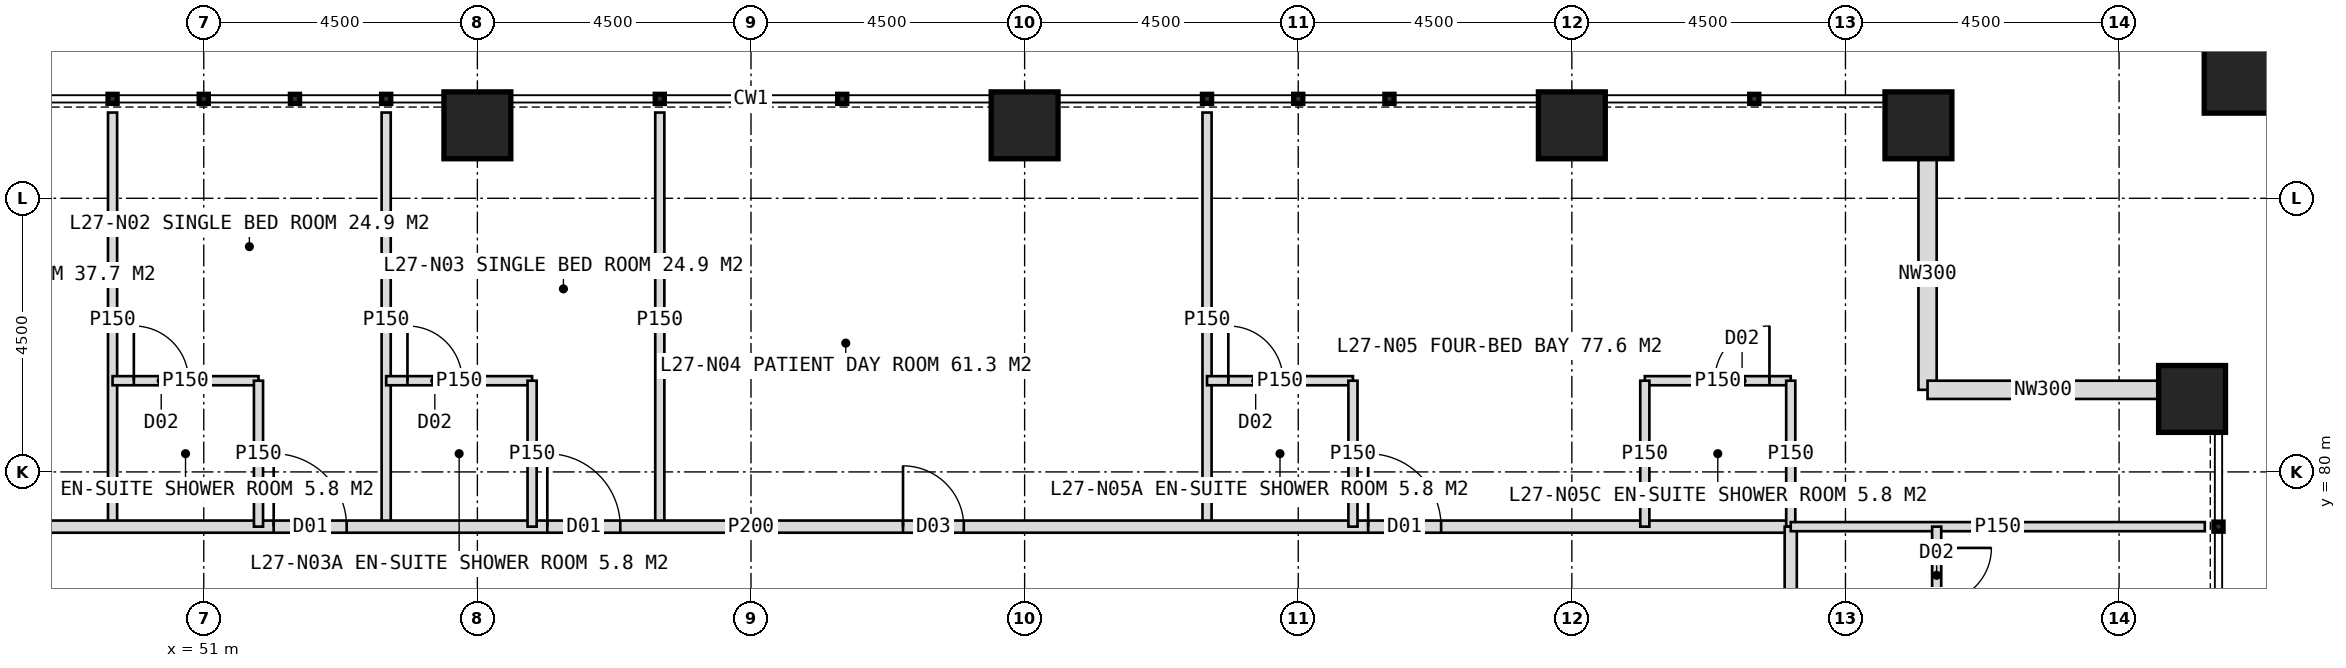
"""IFC4 building model, lengths in metres.
Left out: names, types, materials, properties, quantities, classifications, styles, units other than length and angle.
Written with IfcOpenShell. Run it as: python <this file> out.ifc"""

import sys

from ifc_helpers import new_model, si_unit, direction, frame, frame_2d, origin, origin_2d, place, context, subcontext, project, spatial, rectangle, hollow_rectangle, extrude, element, fill, save


model = new_model("IFC4")
c1 = context("Model", 3, precision=1e-05, world=origin(), true_north=direction((0.0, 1.0)))
c2 = subcontext(c1, "Body", "Model", "MODEL_VIEW")
j1 = project(units=[si_unit("LENGTHUNIT", "METRE"), si_unit("PLANEANGLEUNIT", "RADIAN")], contexts=[c1])
p1 = place(None, origin())
s1 = spatial("IfcSite", under=j1, at=p1, CompositionType="ELEMENT")
p2 = place(p1, origin())
s2 = spatial("IfcBuilding", under=s1, at=p2, CompositionType="ELEMENT")
p3 = place(p2, frame((0.0, 0.0, 116.0)))
s3 = spatial("IfcBuildingStorey", under=s2, at=p3, CompositionType="ELEMENT", Elevation=116.0)
for number, where, z_axis, x_axis in (
    (1, (55.5, 85.7, 0.0), (0.0, 0.0, 1.0), (1.0, 0.0, 0.0)),
    (2, (64.5, 85.7, 0.0), (0.0, 0.0, 1.0), (1.0, 0.0, 0.0)),
    (3, (73.5, 85.7, 0.0), (0.0, 0.0, 1.0), (1.0, 0.0, 0.0)),
    (4, (79.2, 85.7, 0.0), (0.0, 0.0, 1.0), (1.0, 0.0, 0.0)),
    (5, (83.7, 81.2, 0.0), (0.0, 0.0, 1.0), (1.0, 0.0, 0.0)),
):
    element("IfcColumn", number, at=place(p3, frame(where, z_axis=z_axis, x_axis=x_axis)), inside=s3, PredefinedType="COLUMN", context=c2, shape_type="SweptSolid", body=[
        extrude(hollow_rectangle(XDim=1.1, YDim=1.1, WallThickness=0.1, at=origin_2d()), origin(), (0.0, 0.0, 1.0), 4.0),
    ])
p4 = place(p3, frame((84.6, 86.6, 0.0), z_axis=(0.0, 0.0, 1.0), x_axis=(1.0, 0.0, 0.0)))
e6 = element("IfcColumn", 6, at=p4, inside=s3, PredefinedType="COLUMN", context=c2, shape_type="SweptSolid", body=[
    extrude(hollow_rectangle(XDim=1.4, YDim=1.4, WallThickness=0.08, at=origin_2d()), origin(), (0.0, 0.0, 1.0), 4.0),
])
for number, where, z_axis, x_axis in (
    (7, (79.35, 85.15, 0.0), (0.0, 0.0, 1.0), (0.0, -1.0, 0.0)),
    (8, (79.35, 81.35, 0.0), (0.0, 0.0, 1.0), (1.0, 0.0, 0.0)),
):
    element("IfcWall", number, at=place(p3, frame(where, z_axis=z_axis, x_axis=x_axis)), inside=s3, PredefinedType="ELEMENTEDWALL", context=c2, shape_type="SweptSolid", body=[
        extrude(rectangle(XDim=3.8, YDim=0.3, at=frame_2d((1.9, 0.0))), origin(), (0.0, 0.0, 1.0), 4.0),
    ])
for number, where, z_axis, x_axis in (
    (9, (49.5, 79.1, 0.0), (0.0, 0.0, 1.0), (0.0, 1.0, 0.0)),
    (10, (54.0, 79.1, 0.0), (0.0, 0.0, 1.0), (0.0, 1.0, 0.0)),
    (11, (58.5, 79.1, 0.0), (0.0, 0.0, 1.0), (0.0, 1.0, 0.0)),
    (12, (67.5, 79.1, 0.0), (0.0, 0.0, 1.0), (0.0, 1.0, 0.0)),
):
    element("IfcWall", number, at=place(p3, frame(where, z_axis=z_axis, x_axis=x_axis)), inside=s3, PredefinedType="PARTITIONING", context=c2, shape_type="SweptSolid", body=[
        extrude(rectangle(XDim=6.81, YDim=0.15, at=frame_2d((3.405, 0.0))), origin(), (0.0, 0.0, 1.0), 3.75),
    ])
p5 = place(p3, frame((42.9, 79.1, 0.0), z_axis=(0.0, 0.0, 1.0), x_axis=(1.0, 0.0, 0.0)))
e13 = element("IfcWall", 13, at=p5, inside=s3, PredefinedType="PARTITIONING", context=c2, shape_type="SweptSolid", body=[
    extrude(rectangle(XDim=34.2, YDim=0.2, at=frame_2d((17.1, 0.0))), origin(), (0.0, 0.0, 1.0), 3.75),
])
p6 = place(p5, frame((3.25, 0.0, 0.0)))
e14 = element("IfcOpeningElement", 14, at=p6, cuts=e13, PredefinedType="OPENING", context=c2, shape_type="SweptSolid", body=[
    extrude(rectangle(XDim=1.2, YDim=2.2, at=frame_2d((0.6, 1.1))), frame((0.0, 0.11, 0.0), z_axis=(0.0, -1.0, 0.0), x_axis=(1.0, 0.0, 0.0)), (0.0, 0.0, 1.0), 0.22),
])
p7 = place(p5, frame((9.25, 0.0, 0.0)))
e15 = element("IfcOpeningElement", 15, at=p7, cuts=e13, PredefinedType="OPENING", context=c2, shape_type="SweptSolid", body=[
    extrude(rectangle(XDim=1.2, YDim=2.2, at=frame_2d((0.6, 1.1))), frame((0.0, 0.11, 0.0), z_axis=(0.0, -1.0, 0.0), x_axis=(1.0, 0.0, 0.0)), (0.0, 0.0, 1.0), 0.22),
])
p8 = place(p5, frame((13.75, 0.0, 0.0)))
e16 = element("IfcOpeningElement", 16, at=p8, cuts=e13, PredefinedType="OPENING", context=c2, shape_type="SweptSolid", body=[
    extrude(rectangle(XDim=1.2, YDim=2.2, at=frame_2d((0.6, 1.1))), frame((0.0, 0.11, 0.0), z_axis=(0.0, -1.0, 0.0), x_axis=(1.0, 0.0, 0.0)), (0.0, 0.0, 1.0), 0.22),
])
p9 = place(p5, frame((19.6, 0.0, 0.0)))
e17 = element("IfcOpeningElement", 17, at=p9, cuts=e13, PredefinedType="OPENING", context=c2, shape_type="SweptSolid", body=[
    extrude(rectangle(XDim=1.0, YDim=2.1, at=frame_2d((0.5, 1.05))), frame((0.0, 0.11, 0.0), z_axis=(0.0, -1.0, 0.0), x_axis=(1.0, 0.0, 0.0)), (0.0, 0.0, 1.0), 0.22),
])
p10 = place(p5, frame((27.25, 0.0, 0.0)))
e18 = element("IfcOpeningElement", 18, at=p10, cuts=e13, PredefinedType="OPENING", context=c2, shape_type="SweptSolid", body=[
    extrude(rectangle(XDim=1.2, YDim=2.2, at=frame_2d((0.6, 1.1))), frame((0.0, 0.11, 0.0), z_axis=(0.0, -1.0, 0.0), x_axis=(1.0, 0.0, 0.0)), (0.0, 0.0, 1.0), 0.22),
])
p11 = place(p3, frame((49.5, 81.5, 0.0), z_axis=(0.0, 0.0, 1.0), x_axis=(1.0, 0.0, 0.0)))
e19 = element("IfcWall", 19, at=p11, inside=s3, PredefinedType="PARTITIONING", context=c2, shape_type="SweptSolid", body=[
    extrude(rectangle(XDim=2.4, YDim=0.15, at=frame_2d((1.2, 0.0))), origin(), (0.0, 0.0, 1.0), 3.75),
])
p12 = place(p11, frame((0.35, 0.0, 0.0)))
e20 = element("IfcOpeningElement", 20, at=p12, cuts=e19, PredefinedType="OPENING", context=c2, shape_type="SweptSolid", body=[
    extrude(rectangle(XDim=0.9, YDim=2.1, at=frame_2d((0.45, 1.05))), frame((0.0, 0.085, 0.0), z_axis=(0.0, -1.0, 0.0), x_axis=(1.0, 0.0, 0.0)), (0.0, 0.0, 1.0), 0.17),
])
p13 = place(p3, frame((51.9, 79.1, 0.0), z_axis=(0.0, 0.0, 1.0), x_axis=(0.0, 1.0, 0.0)))
e21 = element("IfcWall", 21, at=p13, inside=s3, PredefinedType="PARTITIONING", context=c2, shape_type="SweptSolid", body=[
    extrude(rectangle(XDim=2.4, YDim=0.15, at=frame_2d((1.2, 0.0))), origin(), (0.0, 0.0, 1.0), 3.75),
])
p14 = place(p3, frame((54.0, 81.5, 0.0), z_axis=(0.0, 0.0, 1.0), x_axis=(1.0, 0.0, 0.0)))
e22 = element("IfcWall", 22, at=p14, inside=s3, PredefinedType="PARTITIONING", context=c2, shape_type="SweptSolid", body=[
    extrude(rectangle(XDim=2.4, YDim=0.15, at=frame_2d((1.2, 0.0))), origin(), (0.0, 0.0, 1.0), 3.75),
])
p15 = place(p14, frame((0.35, 0.0, 0.0)))
e23 = element("IfcOpeningElement", 23, at=p15, cuts=e22, PredefinedType="OPENING", context=c2, shape_type="SweptSolid", body=[
    extrude(rectangle(XDim=0.9, YDim=2.1, at=frame_2d((0.45, 1.05))), frame((0.0, 0.085, 0.0), z_axis=(0.0, -1.0, 0.0), x_axis=(1.0, 0.0, 0.0)), (0.0, 0.0, 1.0), 0.17),
])
p16 = place(p3, frame((56.4, 79.1, 0.0), z_axis=(0.0, 0.0, 1.0), x_axis=(0.0, 1.0, 0.0)))
e24 = element("IfcWall", 24, at=p16, inside=s3, PredefinedType="PARTITIONING", context=c2, shape_type="SweptSolid", body=[
    extrude(rectangle(XDim=2.4, YDim=0.15, at=frame_2d((1.2, 0.0))), origin(), (0.0, 0.0, 1.0), 3.75),
])
p17 = place(p3, frame((67.5, 81.5, 0.0), z_axis=(0.0, 0.0, 1.0), x_axis=(1.0, 0.0, 0.0)))
e25 = element("IfcWall", 25, at=p17, inside=s3, PredefinedType="PARTITIONING", context=c2, shape_type="SweptSolid", body=[
    extrude(rectangle(XDim=2.4, YDim=0.15, at=frame_2d((1.2, 0.0))), origin(), (0.0, 0.0, 1.0), 3.75),
])
p18 = place(p17, frame((0.35, 0.0, 0.0)))
e26 = element("IfcOpeningElement", 26, at=p18, cuts=e25, PredefinedType="OPENING", context=c2, shape_type="SweptSolid", body=[
    extrude(rectangle(XDim=0.9, YDim=2.1, at=frame_2d((0.45, 1.05))), frame((0.0, 0.085, 0.0), z_axis=(0.0, -1.0, 0.0), x_axis=(1.0, 0.0, 0.0)), (0.0, 0.0, 1.0), 0.17),
])
p19 = place(p3, frame((69.9, 79.1, 0.0), z_axis=(0.0, 0.0, 1.0), x_axis=(0.0, 1.0, 0.0)))
e27 = element("IfcWall", 27, at=p19, inside=s3, PredefinedType="PARTITIONING", context=c2, shape_type="SweptSolid", body=[
    extrude(rectangle(XDim=2.4, YDim=0.15, at=frame_2d((1.2, 0.0))), origin(), (0.0, 0.0, 1.0), 3.75),
])
p20 = place(p3, frame((74.7, 81.5, 0.0), z_axis=(0.0, 0.0, 1.0), x_axis=(1.0, 0.0, 0.0)))
e28 = element("IfcWall", 28, at=p20, inside=s3, PredefinedType="PARTITIONING", context=c2, shape_type="SweptSolid", body=[
    extrude(rectangle(XDim=2.4, YDim=0.15, at=frame_2d((1.2, 0.0))), origin(), (0.0, 0.0, 1.0), 3.75),
])
p21 = place(p20, frame((1.15, 0.0, 0.0)))
e29 = element("IfcOpeningElement", 29, at=p21, cuts=e28, PredefinedType="OPENING", context=c2, shape_type="SweptSolid", body=[
    extrude(rectangle(XDim=0.9, YDim=2.1, at=frame_2d((0.45, 1.05))), frame((0.0, 0.085, 0.0), z_axis=(0.0, -1.0, 0.0), x_axis=(1.0, 0.0, 0.0)), (0.0, 0.0, 1.0), 0.17),
])
for number, where, z_axis, x_axis in (
    (30, (74.7, 79.1, 0.0), (0.0, 0.0, 1.0), (0.0, 1.0, 0.0)),
    (31, (77.1, 79.1, 0.0), (0.0, 0.0, 1.0), (0.0, 1.0, 0.0)),
):
    element("IfcWall", number, at=place(p3, frame(where, z_axis=z_axis, x_axis=x_axis)), inside=s3, PredefinedType="PARTITIONING", context=c2, shape_type="SweptSolid", body=[
        extrude(rectangle(XDim=2.4, YDim=0.15, at=frame_2d((1.2, 0.0))), origin(), (0.0, 0.0, 1.0), 3.75),
    ])
p22 = place(p3, frame((77.1, 79.1, 0.0), z_axis=(0.0, 0.0, 1.0), x_axis=(0.0, -1.0, 0.0)))
e32 = element("IfcWall", 32, at=p22, inside=s3, PredefinedType="PARTITIONING", context=c2, shape_type="SweptSolid", body=[
    extrude(rectangle(XDim=34.2, YDim=0.2, at=frame_2d((17.1, 0.0))), origin(), (0.0, 0.0, 1.0), 3.75),
])
p23 = place(p22, frame((2.65, 0.0, 0.0)))
e33 = element("IfcOpeningElement", 33, at=p23, cuts=e32, PredefinedType="OPENING", context=c2, shape_type="SweptSolid", body=[
    extrude(rectangle(XDim=1.2, YDim=2.2, at=frame_2d((0.6, 1.1))), frame((0.0, 0.11, 0.0), z_axis=(0.0, -1.0, 0.0), x_axis=(1.0, 0.0, 0.0)), (0.0, 0.0, 1.0), 0.22),
])
p24 = place(p22, frame((10.75, 0.0, 0.0)))
e34 = element("IfcOpeningElement", 34, at=p24, cuts=e32, PredefinedType="OPENING", context=c2, shape_type="SweptSolid", body=[
    extrude(rectangle(XDim=1.2, YDim=2.2, at=frame_2d((0.6, 1.1))), frame((0.0, 0.11, 0.0), z_axis=(0.0, -1.0, 0.0), x_axis=(1.0, 0.0, 0.0)), (0.0, 0.0, 1.0), 0.22),
])
p25 = place(p22, frame((19.75, 0.0, 0.0)))
e35 = element("IfcOpeningElement", 35, at=p25, cuts=e32, PredefinedType="OPENING", context=c2, shape_type="SweptSolid", body=[
    extrude(rectangle(XDim=1.2, YDim=2.2, at=frame_2d((0.6, 1.1))), frame((0.0, 0.11, 0.0), z_axis=(0.0, -1.0, 0.0), x_axis=(1.0, 0.0, 0.0)), (0.0, 0.0, 1.0), 0.22),
])
p26 = place(p22, frame((25.75, 0.0, 0.0)))
e36 = element("IfcOpeningElement", 36, at=p26, cuts=e32, PredefinedType="OPENING", context=c2, shape_type="SweptSolid", body=[
    extrude(rectangle(XDim=1.2, YDim=2.2, at=frame_2d((0.6, 1.1))), frame((0.0, 0.11, 0.0), z_axis=(0.0, -1.0, 0.0), x_axis=(1.0, 0.0, 0.0)), (0.0, 0.0, 1.0), 0.22),
])
p27 = place(p22, frame((30.25, 0.0, 0.0)))
e37 = element("IfcOpeningElement", 37, at=p27, cuts=e32, PredefinedType="OPENING", context=c2, shape_type="SweptSolid", body=[
    extrude(rectangle(XDim=1.2, YDim=2.2, at=frame_2d((0.6, 1.1))), frame((0.0, 0.11, 0.0), z_axis=(0.0, -1.0, 0.0), x_axis=(1.0, 0.0, 0.0)), (0.0, 0.0, 1.0), 0.22),
])
p28 = place(p3, frame((77.1, 79.1, 0.0), z_axis=(0.0, 0.0, 1.0), x_axis=(1.0, 0.0, 0.0)))
e38 = element("IfcWall", 38, at=p28, inside=s3, PredefinedType="PARTITIONING", context=c2, shape_type="SweptSolid", body=[
    extrude(rectangle(XDim=6.81, YDim=0.15, at=frame_2d((3.405, 0.0))), origin(), (0.0, 0.0, 1.0), 3.75),
])
p29 = place(p3, frame((79.5, 79.1, 0.0), z_axis=(0.0, 0.0, 1.0), x_axis=(0.0, -1.0, 0.0)))
e39 = element("IfcWall", 39, at=p29, inside=s3, PredefinedType="PARTITIONING", context=c2, shape_type="SweptSolid", body=[
    extrude(rectangle(XDim=2.4, YDim=0.15, at=frame_2d((1.2, 0.0))), origin(), (0.0, 0.0, 1.0), 3.75),
])
p30 = place(p29, frame((0.35, 0.0, 0.0)))
e40 = element("IfcOpeningElement", 40, at=p30, cuts=e39, PredefinedType="OPENING", context=c2, shape_type="SweptSolid", body=[
    extrude(rectangle(XDim=0.9, YDim=2.1, at=frame_2d((0.45, 1.05))), frame((0.0, 0.085, 0.0), z_axis=(0.0, -1.0, 0.0), x_axis=(1.0, 0.0, 0.0)), (0.0, 0.0, 1.0), 0.17),
])
p31 = place(p7, origin())
e41 = element("IfcDoor", 41, at=p31, inside=s3, OperationType="SINGLE_SWING_LEFT", PredefinedType="DOOR", context=c2, shape_type="SweptSolid", body=[
    extrude(rectangle(XDim=1.2, YDim=2.2, at=frame_2d((0.6, 1.1))), frame((0.0, 0.025, 0.0), z_axis=(0.0, -1.0, 0.0), x_axis=(1.0, 0.0, 0.0)), (0.0, 0.0, 1.0), 0.05),
])
fill(e15, e41)
p32 = place(p12, origin())
e42 = element("IfcDoor", 42, at=p32, inside=s3, OperationType="SINGLE_SWING_LEFT", PredefinedType="DOOR", context=c2, shape_type="SweptSolid", body=[
    extrude(rectangle(XDim=0.9, YDim=2.1, at=frame_2d((0.45, 1.05))), frame((0.0, 0.025, 0.0), z_axis=(0.0, -1.0, 0.0), x_axis=(1.0, 0.0, 0.0)), (0.0, 0.0, 1.0), 0.05),
])
fill(e20, e42)
p33 = place(p8, origin())
e43 = element("IfcDoor", 43, at=p33, inside=s3, OperationType="SINGLE_SWING_LEFT", PredefinedType="DOOR", context=c2, shape_type="SweptSolid", body=[
    extrude(rectangle(XDim=1.2, YDim=2.2, at=frame_2d((0.6, 1.1))), frame((0.0, 0.025, 0.0), z_axis=(0.0, -1.0, 0.0), x_axis=(1.0, 0.0, 0.0)), (0.0, 0.0, 1.0), 0.05),
])
fill(e16, e43)
p34 = place(p15, origin())
e44 = element("IfcDoor", 44, at=p34, inside=s3, OperationType="SINGLE_SWING_LEFT", PredefinedType="DOOR", context=c2, shape_type="SweptSolid", body=[
    extrude(rectangle(XDim=0.9, YDim=2.1, at=frame_2d((0.45, 1.05))), frame((0.0, 0.025, 0.0), z_axis=(0.0, -1.0, 0.0), x_axis=(1.0, 0.0, 0.0)), (0.0, 0.0, 1.0), 0.05),
])
fill(e23, e44)
p35 = place(p9, origin())
e45 = element("IfcDoor", 45, at=p35, inside=s3, OperationType="SINGLE_SWING_LEFT", PredefinedType="DOOR", context=c2, shape_type="SweptSolid", body=[
    extrude(rectangle(XDim=1.0, YDim=2.1, at=frame_2d((0.5, 1.05))), frame((0.0, 0.025, 0.0), z_axis=(0.0, -1.0, 0.0), x_axis=(1.0, 0.0, 0.0)), (0.0, 0.0, 1.0), 0.05),
])
fill(e17, e45)
p36 = place(p10, origin())
e46 = element("IfcDoor", 46, at=p36, inside=s3, OperationType="SINGLE_SWING_LEFT", PredefinedType="DOOR", context=c2, shape_type="SweptSolid", body=[
    extrude(rectangle(XDim=1.2, YDim=2.2, at=frame_2d((0.6, 1.1))), frame((0.0, 0.025, 0.0), z_axis=(0.0, -1.0, 0.0), x_axis=(1.0, 0.0, 0.0)), (0.0, 0.0, 1.0), 0.05),
])
fill(e18, e46)
p37 = place(p18, origin())
e47 = element("IfcDoor", 47, at=p37, inside=s3, OperationType="SINGLE_SWING_LEFT", PredefinedType="DOOR", context=c2, shape_type="SweptSolid", body=[
    extrude(rectangle(XDim=0.9, YDim=2.1, at=frame_2d((0.45, 1.05))), frame((0.0, 0.025, 0.0), z_axis=(0.0, -1.0, 0.0), x_axis=(1.0, 0.0, 0.0)), (0.0, 0.0, 1.0), 0.05),
])
fill(e26, e47)
p38 = place(p21, origin())
e48 = element("IfcDoor", 48, at=p38, inside=s3, OperationType="SINGLE_SWING_RIGHT", PredefinedType="DOOR", context=c2, shape_type="SweptSolid", body=[
    extrude(rectangle(XDim=0.9, YDim=2.1, at=frame_2d((0.45, 1.05))), frame((0.0, 0.025, 0.0), z_axis=(0.0, -1.0, 0.0), x_axis=(1.0, 0.0, 0.0)), (0.0, 0.0, 1.0), 0.05),
])
fill(e29, e48)
p39 = place(p30, origin())
e49 = element("IfcDoor", 49, at=p39, inside=s3, OperationType="SINGLE_SWING_LEFT", PredefinedType="DOOR", context=c2, shape_type="SweptSolid", body=[
    extrude(rectangle(XDim=0.9, YDim=2.1, at=frame_2d((0.45, 1.05))), frame((0.0, 0.025, 0.0), z_axis=(0.0, -1.0, 0.0), x_axis=(1.0, 0.0, 0.0)), (0.0, 0.0, 1.0), 0.05),
])
fill(e40, e49)
save(model, sys.argv[1])
